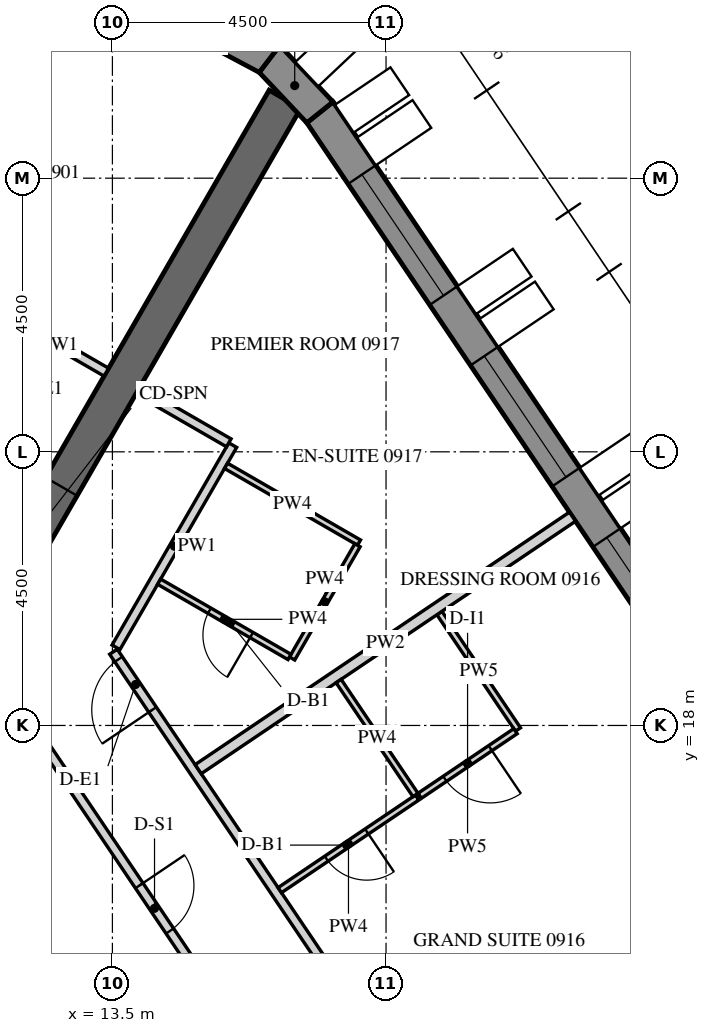
"""IFC4 building model, lengths in metres.
Left out: names, types, materials, properties, quantities, classifications, styles, units other than length and angle.
Written with IfcOpenShell. Run it as: python <this file> out.ifc"""

import sys

from ifc_helpers import new_model, si_unit, direction, frame, frame_2d, origin, place, context, subcontext, project, spatial, polyline, rectangle, outline, extrude, element, fill, save


model = new_model("IFC4")
c1 = context("Model", 3, precision=1e-05, world=origin(), true_north=direction((0.0, 1.0)))
c2 = subcontext(c1, "Body", "Model", "MODEL_VIEW")
j1 = project(units=[si_unit("LENGTHUNIT", "METRE"), si_unit("PLANEANGLEUNIT", "RADIAN")], contexts=[c1])
p1 = place(None, origin())
s1 = spatial("IfcSite", under=j1, at=p1, CompositionType="ELEMENT")
p2 = place(p1, origin())
s2 = spatial("IfcBuilding", under=s1, at=p2, CompositionType="ELEMENT")
p3 = place(p2, frame((0.0, 0.0, 123.3)))
s3 = spatial("IfcBuildingStorey", under=s2, at=p3, CompositionType="ELEMENT", Elevation=123.3)
p4 = place(p3, frame((33.728, 3.153, -0.15), z_axis=(0.0, 0.0, 1.0), x_axis=(-0.559192411416, 0.82903790445, 0.0)))
e1 = element("IfcWall", 1, at=p4, inside=s3, PredefinedType="SOLIDWALL", context=c2, shape_type="SweptSolid", body=[
    extrude(outline(polyline([(-0.026, -0.275), (30.093, -0.275), (30.048, 0.275), (0.026, 0.275), (-0.026, -0.275)])), origin(), (0.0, 0.0, 1.0), 3.9),
])
p5 = place(p4, frame((1.236, 0.0, 1.05)))
e2 = element("IfcOpeningElement", 2, at=p5, cuts=e1, PredefinedType="OPENING", context=c2, shape_type="SweptSolid", body=[
    extrude(rectangle(XDim=2.4, YDim=2.4, at=frame_2d((1.2, 1.2))), frame((0.0, 0.285, 0.0), z_axis=(0.0, -1.0, 0.0), x_axis=(1.0, 0.0, 0.0)), (0.0, 0.0, 1.0), 0.57),
])
p6 = place(p4, frame((4.835, 0.0, 1.05)))
e3 = element("IfcOpeningElement", 3, at=p6, cuts=e1, PredefinedType="OPENING", context=c2, shape_type="SweptSolid", body=[
    extrude(rectangle(XDim=2.4, YDim=2.4, at=frame_2d((1.2, 1.2))), frame((0.0, 0.285, 0.0), z_axis=(0.0, -1.0, 0.0), x_axis=(1.0, 0.0, 0.0)), (0.0, 0.0, 1.0), 0.57),
])
p7 = place(p4, frame((8.436, 0.0, 1.05)))
e4 = element("IfcOpeningElement", 4, at=p7, cuts=e1, PredefinedType="OPENING", context=c2, shape_type="SweptSolid", body=[
    extrude(rectangle(XDim=2.4, YDim=2.4, at=frame_2d((1.2, 1.2))), frame((0.0, 0.285, 0.0), z_axis=(0.0, -1.0, 0.0), x_axis=(1.0, 0.0, 0.0)), (0.0, 0.0, 1.0), 0.57),
])
p8 = place(p4, frame((12.035, 0.0, 1.05)))
e5 = element("IfcOpeningElement", 5, at=p8, cuts=e1, PredefinedType="OPENING", context=c2, shape_type="SweptSolid", body=[
    extrude(rectangle(XDim=2.4, YDim=2.4, at=frame_2d((1.2, 1.2))), frame((0.0, 0.285, 0.0), z_axis=(0.0, -1.0, 0.0), x_axis=(1.0, 0.0, 0.0)), (0.0, 0.0, 1.0), 0.57),
])
p9 = place(p4, frame((15.635, 0.0, 1.05)))
e6 = element("IfcOpeningElement", 6, at=p9, cuts=e1, PredefinedType="OPENING", context=c2, shape_type="SweptSolid", body=[
    extrude(rectangle(XDim=2.4, YDim=2.4, at=frame_2d((1.2, 1.2))), frame((0.0, 0.285, 0.0), z_axis=(0.0, -1.0, 0.0), x_axis=(1.0, 0.0, 0.0)), (0.0, 0.0, 1.0), 0.57),
])
p10 = place(p4, frame((19.236, 0.0, 1.05)))
e7 = element("IfcOpeningElement", 7, at=p10, cuts=e1, PredefinedType="OPENING", context=c2, shape_type="SweptSolid", body=[
    extrude(rectangle(XDim=2.4, YDim=2.4, at=frame_2d((1.2, 1.2))), frame((0.0, 0.285, 0.0), z_axis=(0.0, -1.0, 0.0), x_axis=(1.0, 0.0, 0.0)), (0.0, 0.0, 1.0), 0.57),
])
p11 = place(p4, frame((22.835, 0.0, 1.05)))
e8 = element("IfcOpeningElement", 8, at=p11, cuts=e1, PredefinedType="OPENING", context=c2, shape_type="SweptSolid", body=[
    extrude(rectangle(XDim=2.4, YDim=2.4, at=frame_2d((1.2, 1.2))), frame((0.0, 0.285, 0.0), z_axis=(0.0, -1.0, 0.0), x_axis=(1.0, 0.0, 0.0)), (0.0, 0.0, 1.0), 0.57),
])
p12 = place(p4, frame((26.436, 0.0, 1.05)))
e9 = element("IfcOpeningElement", 9, at=p12, cuts=e1, PredefinedType="OPENING", context=c2, shape_type="SweptSolid", body=[
    extrude(rectangle(XDim=2.4, YDim=2.4, at=frame_2d((1.2, 1.2))), frame((0.0, 0.285, 0.0), z_axis=(0.0, -1.0, 0.0), x_axis=(1.0, 0.0, 0.0)), (0.0, 0.0, 1.0), 0.57),
])
p13 = place(p3, frame((16.913, 28.083, -0.15), z_axis=(0.0, 0.0, 1.0), x_axis=(-0.686196220404, 0.727416488061, 0.0)))
e10 = element("IfcWall", 10, at=p13, inside=s3, PredefinedType="SOLIDWALL", context=c2, shape_type="SweptSolid", body=[
    extrude(outline(polyline([(-0.022, -0.275), (1.253, -0.275), (1.163, 0.275), (0.022, 0.275), (-0.022, -0.275)])), origin(), (0.0, 0.0, 1.0), 3.9),
])
p14 = place(p3, frame((16.083, 28.962, -0.15), z_axis=(0.0, 0.0, 1.0), x_axis=(-0.882995347911, 0.469381737574, 0.0)))
e11 = element("IfcWall", 11, at=p14, inside=s3, PredefinedType="SOLIDWALL", context=c2, shape_type="SweptSolid", body=[
    extrude(outline(polyline([(-0.045, -0.275), (1.253, -0.275), (1.163, 0.275), (0.045, 0.275), (-0.045, -0.275)])), origin(), (0.0, 0.0, 1.0), 3.9),
])
p15 = place(p3, frame((8.083, 14.0, -0.15), z_axis=(0.0, 0.0, 1.0), x_axis=(0.499997680643, 0.866026742862, 0.0)))
e12 = element("IfcWall", 12, at=p15, inside=s3, PredefinedType="SHEAR", context=c2, shape_type="SweptSolid", body=[
    extrude(rectangle(XDim=16.509, YDim=0.6, at=frame_2d((8.254, 0.0))), origin(), (0.0, 0.0, 1.0), 3.9),
])
p16 = place(p15, frame((7.354, 0.0, 0.15)))
e13 = element("IfcOpeningElement", 13, at=p16, cuts=e12, PredefinedType="OPENING", context=c2, shape_type="SweptSolid", body=[
    extrude(rectangle(XDim=1.8, YDim=2.4, at=frame_2d((0.9, 1.2))), frame((0.0, 0.31, 0.0), z_axis=(0.0, -1.0, 0.0), x_axis=(1.0, 0.0, 0.0)), (0.0, 0.0, 1.0), 0.62),
])
p17 = place(p3, frame((13.4, 23.81, 0.0), z_axis=(0.0, 0.0, 1.0), x_axis=(-0.865989075817, 0.500062916607, 0.0)))
e14 = element("IfcWall", 14, at=p17, inside=s3, PredefinedType="PARTITIONING", context=c2, shape_type="SweptSolid", body=[
    extrude(rectangle(XDim=1.8, YDim=0.15, at=frame_2d((0.9, 0.0))), origin(), (0.0, 0.0, 1.0), 2.988),
])
p18 = place(p3, frame((25.821, 0.972, 0.0), z_axis=(0.0, 0.0, 1.0), x_axis=(-0.559193816298, 0.829036956845, 0.0)))
e15 = element("IfcWall", 15, at=p18, inside=s3, PredefinedType="PARTITIONING", context=c2, shape_type="SweptSolid", body=[
    extrude(rectangle(XDim=22.002, YDim=0.15, at=frame_2d((11.001, 0.0))), origin(), (0.0, 0.0, 1.0), 2.988),
])
p19 = place(p18, frame((3.369, 0.0, 0.0)))
e16 = element("IfcOpeningElement", 16, at=p19, cuts=e15, PredefinedType="OPENING", context=c2, shape_type="SweptSolid", body=[
    extrude(rectangle(XDim=1.0, YDim=2.1, at=frame_2d((0.5, 1.05))), frame((0.0, 0.085, 0.0), z_axis=(0.0, -1.0, 0.0), x_axis=(1.0, 0.0, 0.0)), (0.0, 0.0, 1.0), 0.17),
])
p20 = place(p18, frame((10.721, 0.0, 0.0)))
e17 = element("IfcOpeningElement", 17, at=p20, cuts=e15, PredefinedType="OPENING", context=c2, shape_type="SweptSolid", body=[
    extrude(rectangle(XDim=1.0, YDim=2.1, at=frame_2d((0.5, 1.05))), frame((0.0, 0.085, 0.0), z_axis=(0.0, -1.0, 0.0), x_axis=(1.0, 0.0, 0.0)), (0.0, 0.0, 1.0), 0.17),
])
p21 = place(p18, frame((20.852, 0.0, 0.0)))
e18 = element("IfcOpeningElement", 18, at=p21, cuts=e15, PredefinedType="OPENING", context=c2, shape_type="SweptSolid", body=[
    extrude(rectangle(XDim=1.0, YDim=2.1, at=frame_2d((0.5, 1.05))), frame((0.0, 0.085, 0.0), z_axis=(0.0, -1.0, 0.0), x_axis=(1.0, 0.0, 0.0)), (0.0, 0.0, 1.0), 0.17),
])
p22 = place(p3, frame((13.559, 19.285, 0.0), z_axis=(0.0, 0.0, 1.0), x_axis=(0.499975646431, 0.866039463868, 0.0)))
e19 = element("IfcWall", 19, at=p22, inside=s3, PredefinedType="PARTITIONING", context=c2, shape_type="SweptSolid", body=[
    extrude(rectangle(XDim=3.84, YDim=0.15, at=frame_2d((1.92, 0.0))), origin(), (0.0, 0.0, 1.0), 2.988),
])
p23 = place(p3, frame((15.414, 22.648, 0.0), z_axis=(0.0, 0.0, 1.0), x_axis=(-0.866074815912, 0.499914405916, 0.0)))
e20 = element("IfcWall", 20, at=p23, inside=s3, PredefinedType="PARTITIONING", context=c2, shape_type="SweptSolid", body=[
    extrude(rectangle(XDim=1.725, YDim=0.15, at=frame_2d((0.862, 0.0))), origin(), (0.0, 0.0, 1.0), 2.988),
])
p24 = place(p3, frame((11.465, 19.037, 0.0), z_axis=(0.0, 0.0, 1.0), x_axis=(0.559196064773, -0.829035440221, 0.0)))
e21 = element("IfcWall", 21, at=p24, inside=s3, PredefinedType="PARTITIONING", context=c2, shape_type="SweptSolid", body=[
    extrude(rectangle(XDim=9.757, YDim=0.15, at=frame_2d((4.878, 0.0))), origin(), (0.0, 0.0, 1.0), 2.988),
])
p25 = place(p24, frame((4.428, 0.0, 0.0)))
e22 = element("IfcOpeningElement", 22, at=p25, cuts=e21, PredefinedType="OPENING", context=c2, shape_type="SweptSolid", body=[
    extrude(rectangle(XDim=0.9, YDim=2.1, at=frame_2d((0.45, 1.05))), frame((0.0, 0.085, 0.0), z_axis=(0.0, -1.0, 0.0), x_axis=(1.0, 0.0, 0.0)), (0.0, 0.0, 1.0), 0.17),
])
p26 = place(p3, frame((18.512, 16.815, 0.0), z_axis=(0.0, 0.0, 1.0), x_axis=(-0.829005477618, -0.559240483226, 0.0)))
e23 = element("IfcWall", 23, at=p26, inside=s3, PredefinedType="PARTITIONING", context=c2, shape_type="SweptSolid", body=[
    extrude(rectangle(XDim=2.725, YDim=0.1, at=frame_2d((1.363, 0.0))), origin(), (0.0, 0.0, 1.0), 2.988),
])
p27 = place(p26, frame((1.0, 0.0, 0.0)))
e24 = element("IfcOpeningElement", 24, at=p27, cuts=e23, PredefinedType="OPENING", context=c2, shape_type="SweptSolid", body=[
    extrude(rectangle(XDim=0.8, YDim=2.1, at=frame_2d((0.4, 1.05))), frame((0.0, 0.06, 0.0), z_axis=(0.0, -1.0, 0.0), x_axis=(1.0, 0.0, 0.0)), (0.0, 0.0, 1.0), 0.12),
])
p28 = place(p3, frame((18.878, 19.849, 0.0), z_axis=(0.0, 0.0, 1.0), x_axis=(0.559204176839, -0.829029968461, 0.0)))
e25 = element("IfcWall", 25, at=p28, inside=s3, PredefinedType="PARTITIONING", context=c2, shape_type="SweptSolid", body=[
    extrude(rectangle(XDim=2.31, YDim=0.1, at=frame_2d((1.155, 0.0))), origin(), (0.0, 0.0, 1.0), 2.988),
])
p29 = place(p3, frame((20.128, 17.906, 0.0), z_axis=(0.0, 0.0, 1.0), x_axis=(-0.82903334026, -0.559199178055, 0.0)))
e26 = element("IfcWall", 26, at=p29, inside=s3, PredefinedType="PARTITIONING", context=c2, shape_type="SweptSolid", body=[
    extrude(rectangle(XDim=1.9, YDim=0.1, at=frame_2d((0.95, 0.0))), origin(), (0.0, 0.0, 1.0), 2.988),
])
p30 = place(p29, frame((0.5, 0.0, 0.0)))
e27 = element("IfcOpeningElement", 27, at=p30, cuts=e26, PredefinedType="OPENING", context=c2, shape_type="SweptSolid", body=[
    extrude(rectangle(XDim=0.9, YDim=2.1, at=frame_2d((0.45, 1.05))), frame((0.0, 0.06, 0.0), z_axis=(0.0, -1.0, 0.0), x_axis=(1.0, 0.0, 0.0)), (0.0, 0.0, 1.0), 0.12),
])
p31 = place(p3, frame((21.066, 21.433, 0.0), z_axis=(0.0, 0.0, 1.0), x_axis=(-0.829028170871, -0.559206841788, 0.0)))
e28 = element("IfcWall", 28, at=p31, inside=s3, PredefinedType="PARTITIONING", context=c2, shape_type="SweptSolid", body=[
    extrude(rectangle(XDim=7.425, YDim=0.18, at=frame_2d((3.712, 0.0))), origin(), (0.0, 0.0, 1.0), 2.988),
])
p32 = place(p3, frame((18.484, 16.857, 0.0), z_axis=(0.0, 0.0, 1.0), x_axis=(-0.559203826655, 0.82903020467, 0.0)))
e29 = element("IfcWall", 29, at=p32, inside=s3, PredefinedType="PARTITIONING", context=c2, shape_type="SweptSolid", body=[
    extrude(rectangle(XDim=2.26, YDim=0.1, at=frame_2d((1.13, 0.0))), origin(), (0.0, 0.0, 1.0), 2.988),
])
p33 = place(p3, frame((15.369, 22.27, 0.0), z_axis=(0.0, 0.0, 1.0), x_axis=(0.866039067339, -0.499976333282, 0.0)))
e30 = element("IfcWall", 30, at=p33, inside=s3, PredefinedType="PARTITIONING", context=c2, shape_type="SweptSolid", body=[
    extrude(rectangle(XDim=2.525, YDim=0.1, at=frame_2d((1.262, 0.0))), origin(), (0.0, 0.0, 1.0), 2.988),
])
p34 = place(p3, frame((17.531, 20.964, 0.0), z_axis=(0.0, 0.0, 1.0), x_axis=(-0.500010803666, -0.866019166195, 0.0)))
e31 = element("IfcWall", 31, at=p34, inside=s3, PredefinedType="PARTITIONING", context=c2, shape_type="SweptSolid", body=[
    extrude(rectangle(XDim=2.15, YDim=0.1, at=frame_2d((1.075, 0.0))), origin(), (0.0, 0.0, 1.0), 2.988),
])
p35 = place(p3, frame((16.412, 19.127, 0.0), z_axis=(0.0, 0.0, 1.0), x_axis=(-0.866006523861, 0.500032699561, 0.0)))
e32 = element("IfcWall", 32, at=p35, inside=s3, PredefinedType="PARTITIONING", context=c2, shape_type="SweptSolid", body=[
    extrude(rectangle(XDim=2.475, YDim=0.1, at=frame_2d((1.237, 0.0))), origin(), (0.0, 0.0, 1.0), 2.988),
])
p36 = place(p35, frame((0.72, 0.0, 0.0)))
e33 = element("IfcOpeningElement", 33, at=p36, cuts=e32, PredefinedType="OPENING", context=c2, shape_type="SweptSolid", body=[
    extrude(rectangle(XDim=0.8, YDim=2.1, at=frame_2d((0.4, 1.05))), frame((0.0, 0.06, 0.0), z_axis=(0.0, -1.0, 0.0), x_axis=(1.0, 0.0, 0.0)), (0.0, 0.0, 1.0), 0.12),
])
p37 = place(p10, frame((0.0, 0.205, 0.0)))
e34 = element("IfcWindow", 34, at=p37, inside=s3, PartitioningType="DOUBLE_PANEL_VERTICAL", PredefinedType="WINDOW", context=c2, shape_type="SweptSolid", body=[
    extrude(rectangle(XDim=2.4, YDim=2.4, at=frame_2d((1.2, 1.2))), frame((0.0, 0.03, 0.0), z_axis=(0.0, -1.0, 0.0), x_axis=(1.0, 0.0, 0.0)), (0.0, 0.0, 1.0), 0.06),
])
fill(e7, e34)
p38 = place(p11, frame((0.0, 0.205, 0.0)))
e35 = element("IfcWindow", 35, at=p38, inside=s3, PartitioningType="DOUBLE_PANEL_VERTICAL", PredefinedType="WINDOW", context=c2, shape_type="SweptSolid", body=[
    extrude(rectangle(XDim=2.4, YDim=2.4, at=frame_2d((1.2, 1.2))), frame((0.0, 0.03, 0.0), z_axis=(0.0, -1.0, 0.0), x_axis=(1.0, 0.0, 0.0)), (0.0, 0.0, 1.0), 0.06),
])
fill(e8, e35)
p39 = place(p12, frame((0.0, 0.205, 0.0)))
e36 = element("IfcWindow", 36, at=p39, inside=s3, PartitioningType="DOUBLE_PANEL_VERTICAL", PredefinedType="WINDOW", context=c2, shape_type="SweptSolid", body=[
    extrude(rectangle(XDim=2.4, YDim=2.4, at=frame_2d((1.2, 1.2))), frame((0.0, 0.03, 0.0), z_axis=(0.0, -1.0, 0.0), x_axis=(1.0, 0.0, 0.0)), (0.0, 0.0, 1.0), 0.06),
])
fill(e9, e36)
p40 = place(p16, origin())
e37 = element("IfcDoor", 37, at=p40, inside=s3, OperationType="DOUBLE_DOOR_SINGLE_SWING", PredefinedType="DOOR", context=c2, shape_type="SweptSolid", body=[
    extrude(rectangle(XDim=1.8, YDim=2.4, at=frame_2d((0.9, 1.2))), frame((0.0, 0.025, 0.0), z_axis=(0.0, -1.0, 0.0), x_axis=(1.0, 0.0, 0.0)), (0.0, 0.0, 1.0), 0.05),
])
fill(e13, e37)
p41 = place(p27, origin())
e38 = element("IfcDoor", 38, at=p41, inside=s3, OperationType="SINGLE_SWING_LEFT", PredefinedType="DOOR", context=c2, shape_type="SweptSolid", body=[
    extrude(rectangle(XDim=0.8, YDim=2.1, at=frame_2d((0.4, 1.05))), frame((0.0, 0.025, 0.0), z_axis=(0.0, -1.0, 0.0), x_axis=(1.0, 0.0, 0.0)), (0.0, 0.0, 1.0), 0.05),
])
fill(e24, e38)
p42 = place(p30, origin())
e39 = element("IfcDoor", 39, at=p42, inside=s3, OperationType="SINGLE_SWING_RIGHT", PredefinedType="DOOR", context=c2, shape_type="SweptSolid", body=[
    extrude(rectangle(XDim=0.9, YDim=2.1, at=frame_2d((0.45, 1.05))), frame((0.0, 0.025, 0.0), z_axis=(0.0, -1.0, 0.0), x_axis=(1.0, 0.0, 0.0)), (0.0, 0.0, 1.0), 0.05),
])
fill(e27, e39)
p43 = place(p21, origin())
e40 = element("IfcDoor", 40, at=p43, inside=s3, OperationType="SINGLE_SWING_LEFT", PredefinedType="DOOR", context=c2, shape_type="SweptSolid", body=[
    extrude(rectangle(XDim=1.0, YDim=2.1, at=frame_2d((0.5, 1.05))), frame((0.0, 0.025, 0.0), z_axis=(0.0, -1.0, 0.0), x_axis=(1.0, 0.0, 0.0)), (0.0, 0.0, 1.0), 0.05),
])
fill(e18, e40)
p44 = place(p36, origin())
e41 = element("IfcDoor", 41, at=p44, inside=s3, OperationType="SINGLE_SWING_RIGHT", PredefinedType="DOOR", context=c2, shape_type="SweptSolid", body=[
    extrude(rectangle(XDim=0.8, YDim=2.1, at=frame_2d((0.4, 1.05))), frame((0.0, 0.025, 0.0), z_axis=(0.0, -1.0, 0.0), x_axis=(1.0, 0.0, 0.0)), (0.0, 0.0, 1.0), 0.05),
])
fill(e33, e41)
p45 = place(p25, origin())
e42 = element("IfcDoor", 42, at=p45, inside=s3, OperationType="SINGLE_SWING_RIGHT", PredefinedType="DOOR", context=c2, shape_type="SweptSolid", body=[
    extrude(rectangle(XDim=0.9, YDim=2.1, at=frame_2d((0.45, 1.05))), frame((0.0, 0.025, 0.0), z_axis=(0.0, -1.0, 0.0), x_axis=(1.0, 0.0, 0.0)), (0.0, 0.0, 1.0), 0.05),
])
fill(e22, e42)
save(model, sys.argv[1])
